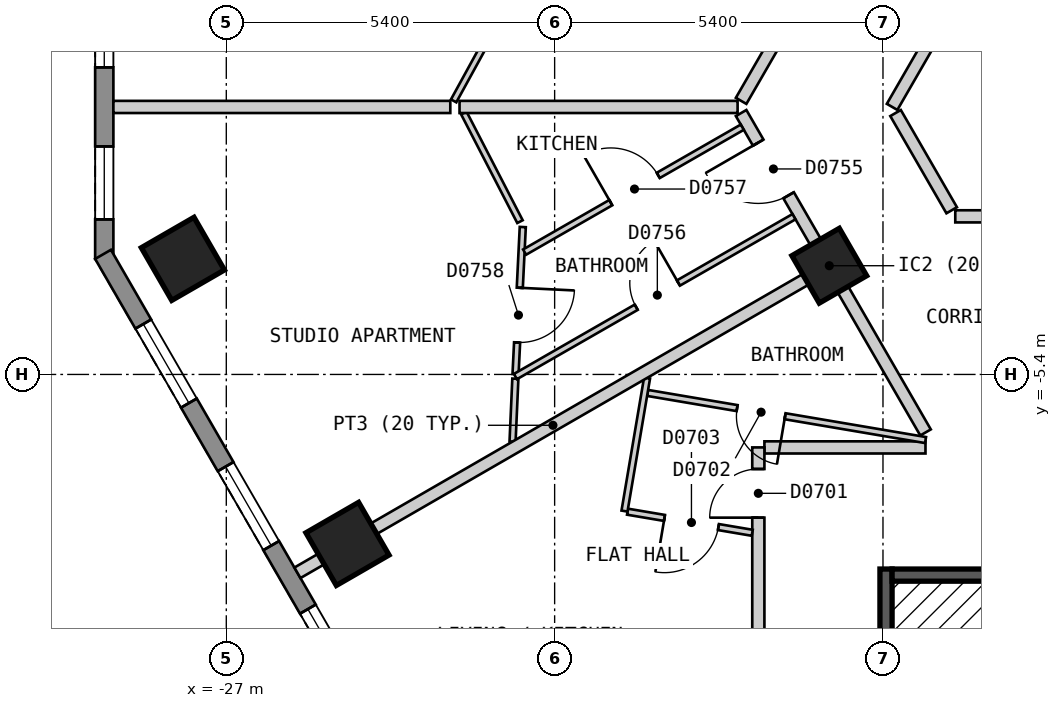
"""IFC4 building model, lengths in metres.
Left out: names, types, materials, properties, quantities, classifications, styles, units other than length and angle.
Written with IfcOpenShell. Run it as: python <this file> out.ifc"""

import sys

from ifc_helpers import new_model, si_unit, direction, frame, frame_2d, origin, origin_2d, place, context, subcontext, project, spatial, polyline, rectangle, outline, extrude, element, fill, save


model = new_model("IFC4")
c1 = context("Model", 3, precision=1e-05, world=origin(), true_north=direction((0.0, 1.0)))
c2 = subcontext(c1, "Body", "Model", "MODEL_VIEW")
j1 = project(units=[si_unit("LENGTHUNIT", "METRE"), si_unit("PLANEANGLEUNIT", "RADIAN")], contexts=[c1])
p1 = place(None, origin())
s1 = spatial("IfcSite", under=j1, at=p1, CompositionType="ELEMENT")
p2 = place(p1, origin())
s2 = spatial("IfcBuilding", under=s1, at=p2, CompositionType="ELEMENT")
p3 = place(p2, frame((0.0, 0.0, 93.0)))
s3 = spatial("IfcBuildingStorey", under=s2, at=p3, CompositionType="ELEMENT", Elevation=93.0)
for number, where, z_axis, x_axis in (
    (1, (-27.714, -3.499, 0.0), (0.0, 0.0, 1.0), (0.5, -0.866, 0.0)),
    (2, (-25.007, -8.187, 0.0), (0.0, 0.0, 1.0), (0.5, -0.866, 0.0)),
):
    element("IfcColumn", number, at=place(p3, frame(where, z_axis=z_axis, x_axis=x_axis)), inside=s3, PredefinedType="COLUMN", context=c2, shape_type="SweptSolid", body=[
        extrude(rectangle(XDim=1.0, YDim=1.0, at=origin_2d()), origin(), (0.0, 0.0, 1.0), 3.0),
    ])
p4 = place(p3, frame((-17.083, -3.612, 0.0), z_axis=(0.0, 0.0, 1.0), x_axis=(0.5, -0.866025403784, 0.0)))
e3 = element("IfcColumn", 3, at=p4, inside=s3, PredefinedType="COLUMN", context=c2, shape_type="SweptSolid", body=[
    extrude(rectangle(XDim=0.9, YDim=0.9, at=origin_2d()), origin(), (0.0, 0.0, 1.0), 3.0),
])
p5 = place(p3, frame((-29.007, 1.5, 0.0), z_axis=(0.0, 0.0, 1.0), x_axis=(0.0, -1.0, 0.0)))
e4 = element("IfcWall", 4, at=p5, inside=s3, PredefinedType="SOLIDWALL", context=c2, shape_type="SweptSolid", body=[
    extrude(outline(polyline([(0.0, -0.15), (5.0, -0.15), (4.92, 0.15), (0.08, 0.15), (0.0, -0.15)])), origin(), (0.0, 0.0, 1.0), 2.7),
])
p6 = place(p5, frame((0.65, 0.0, 0.15)))
e5 = element("IfcOpeningElement", 5, at=p6, cuts=e4, PredefinedType="OPENING", context=c2, shape_type="SweptSolid", body=[
    extrude(rectangle(XDim=1.2, YDim=2.1, at=frame_2d((0.6, 1.05))), frame((0.0, 0.16, 0.0), z_axis=(0.0, -1.0, 0.0), x_axis=(1.0, 0.0, 0.0)), (0.0, 0.0, 1.0), 0.32),
])
p7 = place(p5, frame((3.15, 0.0, 0.15)))
e6 = element("IfcOpeningElement", 6, at=p7, cuts=e4, PredefinedType="OPENING", context=c2, shape_type="SweptSolid", body=[
    extrude(rectangle(XDim=1.2, YDim=2.1, at=frame_2d((0.6, 1.05))), frame((0.0, 0.16, 0.0), z_axis=(0.0, -1.0, 0.0), x_axis=(1.0, 0.0, 0.0)), (0.0, 0.0, 1.0), 0.32),
])
p8 = place(p3, frame((-29.027, -3.425, 0.0), z_axis=(0.0, 0.0, 1.0), x_axis=(0.500035407905, -0.866004960056, 0.0)))
e7 = element("IfcWall", 7, at=p8, inside=s3, PredefinedType="SOLIDWALL", context=c2, shape_type="SweptSolid", body=[
    extrude(outline(polyline([(0.0, -0.15), (23.094, -0.15), (23.014, 0.15), (0.08, 0.15), (0.0, -0.15)])), origin(), (0.0, 0.0, 1.0), 2.7),
])
p9 = place(p8, frame((1.324, 0.0, 0.15)))
e8 = element("IfcOpeningElement", 8, at=p9, cuts=e7, PredefinedType="OPENING", context=c2, shape_type="SweptSolid", body=[
    extrude(rectangle(XDim=1.5, YDim=2.1, at=frame_2d((0.75, 1.05))), frame((0.0, 0.16, 0.0), z_axis=(0.0, -1.0, 0.0), x_axis=(1.0, 0.0, 0.0)), (0.0, 0.0, 1.0), 0.32),
])
p10 = place(p8, frame((4.031, 0.0, 0.15)))
e9 = element("IfcOpeningElement", 9, at=p10, cuts=e7, PredefinedType="OPENING", context=c2, shape_type="SweptSolid", body=[
    extrude(rectangle(XDim=1.5, YDim=2.1, at=frame_2d((0.75, 1.05))), frame((0.0, 0.16, 0.0), z_axis=(0.0, -1.0, 0.0), x_axis=(1.0, 0.0, 0.0)), (0.0, 0.0, 1.0), 0.32),
])
p11 = place(p8, frame((6.737, 0.0, 0.15)))
e10 = element("IfcOpeningElement", 10, at=p11, cuts=e7, PredefinedType="OPENING", context=c2, shape_type="SweptSolid", body=[
    extrude(rectangle(XDim=1.5, YDim=2.1, at=frame_2d((0.75, 1.05))), frame((0.0, 0.16, 0.0), z_axis=(0.0, -1.0, 0.0), x_axis=(1.0, 0.0, 0.0)), (0.0, 0.0, 1.0), 0.32),
])
p12 = place(p8, frame((9.444, 0.0, 0.15)))
e11 = element("IfcOpeningElement", 11, at=p12, cuts=e7, PredefinedType="OPENING", context=c2, shape_type="SweptSolid", body=[
    extrude(rectangle(XDim=1.5, YDim=2.1, at=frame_2d((0.75, 1.05))), frame((0.0, 0.16, 0.0), z_axis=(0.0, -1.0, 0.0), x_axis=(1.0, 0.0, 0.0)), (0.0, 0.0, 1.0), 0.32),
])
p13 = place(p8, frame((12.151, 0.0, 0.15)))
e12 = element("IfcOpeningElement", 12, at=p13, cuts=e7, PredefinedType="OPENING", context=c2, shape_type="SweptSolid", body=[
    extrude(rectangle(XDim=1.5, YDim=2.1, at=frame_2d((0.75, 1.05))), frame((0.0, 0.16, 0.0), z_axis=(0.0, -1.0, 0.0), x_axis=(1.0, 0.0, 0.0)), (0.0, 0.0, 1.0), 0.32),
])
p14 = place(p8, frame((14.857, 0.0, 0.15)))
e13 = element("IfcOpeningElement", 13, at=p14, cuts=e7, PredefinedType="OPENING", context=c2, shape_type="SweptSolid", body=[
    extrude(rectangle(XDim=1.5, YDim=2.1, at=frame_2d((0.75, 1.05))), frame((0.0, 0.16, 0.0), z_axis=(0.0, -1.0, 0.0), x_axis=(1.0, 0.0, 0.0)), (0.0, 0.0, 1.0), 0.32),
])
p15 = place(p8, frame((17.564, 0.0, 0.15)))
e14 = element("IfcOpeningElement", 14, at=p15, cuts=e7, PredefinedType="OPENING", context=c2, shape_type="SweptSolid", body=[
    extrude(rectangle(XDim=1.5, YDim=2.1, at=frame_2d((0.75, 1.05))), frame((0.0, 0.16, 0.0), z_axis=(0.0, -1.0, 0.0), x_axis=(1.0, 0.0, 0.0)), (0.0, 0.0, 1.0), 0.32),
])
p16 = place(p8, frame((20.27, 0.0, 0.15)))
e15 = element("IfcOpeningElement", 15, at=p16, cuts=e7, PredefinedType="OPENING", context=c2, shape_type="SweptSolid", body=[
    extrude(rectangle(XDim=1.5, YDim=2.1, at=frame_2d((0.75, 1.05))), frame((0.0, 0.16, 0.0), z_axis=(0.0, -1.0, 0.0), x_axis=(1.0, 0.0, 0.0)), (0.0, 0.0, 1.0), 0.32),
])
p17 = place(p3, frame((-15.993, -1.101, 0.0), z_axis=(0.0, 0.0, 1.0), x_axis=(0.499894174133, -0.866086493757, 0.0)))
e16 = element("IfcWall", 16, at=p17, inside=s3, PredefinedType="PARTITIONING", context=c2, shape_type="SweptSolid", body=[
    extrude(rectangle(XDim=1.846, YDim=0.2, at=frame_2d((0.923, 0.0))), origin(), (0.0, 0.0, 1.0), 2.7),
])
p18 = place(p3, frame((-18.533, -1.101, 0.0), z_axis=(0.0, 0.0, 1.0), x_axis=(0.500135180047, -0.865947343479, 0.0)))
e17 = element("IfcWall", 17, at=p18, inside=s3, PredefinedType="PARTITIONING", context=c2, shape_type="SweptSolid", body=[
    extrude(rectangle(XDim=2.799, YDim=0.2, at=frame_2d((1.399, 0.0))), origin(), (0.0, 0.0, 1.0), 2.7),
])
p19 = place(p18, frame((0.562, 0.0, 0.0)))
e18 = element("IfcOpeningElement", 18, at=p19, cuts=e17, PredefinedType="OPENING", context=c2, shape_type="SweptSolid", body=[
    extrude(rectangle(XDim=1.0, YDim=2.1, at=frame_2d((0.5, 1.05))), frame((0.0, 0.11, 0.0), z_axis=(0.0, -1.0, 0.0), x_axis=(1.0, 0.0, 0.0)), (0.0, 0.0, 1.0), 0.22),
])
p20 = place(p3, frame((-16.855, -4.008, 0.0), z_axis=(0.0, 0.0, 1.0), x_axis=(0.500151474942, -0.865937932021, 0.0)))
e19 = element("IfcWall", 19, at=p20, inside=s3, PredefinedType="PARTITIONING", context=c2, shape_type="SweptSolid", body=[
    extrude(rectangle(XDim=2.709, YDim=0.2, at=frame_2d((1.354, 0.0))), origin(), (0.0, 0.0, 1.0), 2.7),
])
p21 = place(p3, frame((-18.15, -6.6, 0.0), z_axis=(0.0, 0.0, 1.0), x_axis=(1.0, 0.0, 0.0)))
e20 = element("IfcWall", 20, at=p21, inside=s3, PredefinedType="PARTITIONING", context=c2, shape_type="SweptSolid", body=[
    extrude(rectangle(XDim=2.649, YDim=0.2, at=frame_2d((1.324, 0.0))), origin(), (0.0, 0.0, 1.0), 2.7),
])
p22 = place(p3, frame((-15.011, -2.8, 0.0), z_axis=(0.0, 0.0, 1.0), x_axis=(1.0, 0.0, 0.0)))
e21 = element("IfcWall", 21, at=p22, inside=s3, PredefinedType="PARTITIONING", context=c2, shape_type="SweptSolid", body=[
    extrude(rectangle(XDim=7.982, YDim=0.2, at=frame_2d((3.991, 0.0))), origin(), (0.0, 0.0, 1.0), 2.7),
])
p23 = place(p3, frame((-16.05, -1.0, 0.0), z_axis=(0.0, 0.0, 1.0), x_axis=(0.499962449088, 0.866047082728, 0.0)))
e22 = element("IfcWall", 22, at=p23, inside=s3, PredefinedType="PARTITIONING", context=c2, shape_type="SweptSolid", body=[
    extrude(rectangle(XDim=10.391, YDim=0.2, at=frame_2d((5.195, 0.0))), origin(), (0.0, 0.0, 1.0), 2.7),
])
p24 = place(p23, frame((4.745, 0.0, 0.0)))
e23 = element("IfcOpeningElement", 23, at=p24, cuts=e22, PredefinedType="OPENING", context=c2, shape_type="SweptSolid", body=[
    extrude(rectangle(XDim=0.9, YDim=2.1, at=frame_2d((0.45, 1.05))), frame((0.0, 0.11, 0.0), z_axis=(0.0, -1.0, 0.0), x_axis=(1.0, 0.0, 0.0)), (0.0, 0.0, 1.0), 0.22),
])
p25 = place(p3, frame((-18.533, -0.901, 0.0), z_axis=(0.0, 0.0, 1.0), x_axis=(0.499981198768, 0.866036258409, 0.0)))
e24 = element("IfcWall", 24, at=p25, inside=s3, PredefinedType="PARTITIONING", context=c2, shape_type="SweptSolid", body=[
    extrude(rectangle(XDim=20.093, YDim=0.2, at=frame_2d((10.046, 0.0))), origin(), (0.0, 0.0, 1.0), 2.7),
])
p26 = place(p25, frame((14.57, 0.0, 0.0)))
e25 = element("IfcOpeningElement", 25, at=p26, cuts=e24, PredefinedType="OPENING", context=c2, shape_type="SweptSolid", body=[
    extrude(rectangle(XDim=1.0, YDim=2.1, at=frame_2d((0.5, 1.05))), frame((0.0, 0.11, 0.0), z_axis=(0.0, -1.0, 0.0), x_axis=(1.0, 0.0, 0.0)), (0.0, 0.0, 1.0), 0.22),
])
p27 = place(p25, frame((4.523, 0.0, 0.0)))
e26 = element("IfcOpeningElement", 26, at=p27, cuts=e24, PredefinedType="OPENING", context=c2, shape_type="SweptSolid", body=[
    extrude(rectangle(XDim=1.0, YDim=2.1, at=frame_2d((0.5, 1.05))), frame((0.0, 0.11, 0.0), z_axis=(0.0, -1.0, 0.0), x_axis=(1.0, 0.0, 0.0)), (0.0, 0.0, 1.0), 0.22),
])
p28 = place(p3, frame((-18.25, -10.479, 0.0), z_axis=(0.0, 0.0, 1.0), x_axis=(0.0, 1.0, 0.0)))
e27 = element("IfcWall", 27, at=p28, inside=s3, PredefinedType="PARTITIONING", context=c2, shape_type="SweptSolid", body=[
    extrude(rectangle(XDim=3.879, YDim=0.2, at=frame_2d((1.939, 0.0))), origin(), (0.0, 0.0, 1.0), 2.7),
])
p29 = place(p28, frame((2.724, 0.0, 0.0)))
e28 = element("IfcOpeningElement", 28, at=p29, cuts=e27, PredefinedType="OPENING", context=c2, shape_type="SweptSolid", body=[
    extrude(rectangle(XDim=0.8, YDim=2.1, at=frame_2d((0.4, 1.05))), frame((0.0, 0.11, 0.0), z_axis=(0.0, -1.0, 0.0), x_axis=(1.0, 0.0, 0.0)), (0.0, 0.0, 1.0), 0.22),
])
p30 = place(p3, frame((-23.093, -1.101, 0.0), z_axis=(0.0, 0.0, 1.0), x_axis=(0.459171814268, -0.888347479865, 0.0)))
e29 = element("IfcWall", 29, at=p30, inside=s3, PredefinedType="PARTITIONING", context=c2, shape_type="SweptSolid", body=[
    extrude(rectangle(XDim=2.01, YDim=0.1, at=frame_2d((1.005, 0.0))), origin(), (0.0, 0.0, 1.0), 2.7),
])
p31 = place(p3, frame((-20.071, -5.704, 0.0), z_axis=(0.0, 0.0, 1.0), x_axis=(0.985933263306, -0.16713946364, 0.0)))
e30 = element("IfcWall", 30, at=p31, inside=s3, PredefinedType="PARTITIONING", context=c2, shape_type="SweptSolid", body=[
    extrude(rectangle(XDim=4.636, YDim=0.1, at=frame_2d((2.318, 0.0))), origin(), (0.0, 0.0, 1.0), 2.7),
])
p32 = place(p31, frame((1.493, 0.0, 0.0)))
e31 = element("IfcOpeningElement", 31, at=p32, cuts=e30, PredefinedType="OPENING", context=c2, shape_type="SweptSolid", body=[
    extrude(rectangle(XDim=0.8, YDim=2.1, at=frame_2d((0.4, 1.05))), frame((0.0, 0.06, 0.0), z_axis=(0.0, -1.0, 0.0), x_axis=(1.0, 0.0, 0.0)), (0.0, 0.0, 1.0), 0.12),
])
p33 = place(p3, frame((-20.401, -7.657, 0.0), z_axis=(0.0, 0.0, 1.0), x_axis=(0.985991281902, -0.166796858522, 0.0)))
e32 = element("IfcWall", 32, at=p33, inside=s3, PredefinedType="PARTITIONING", context=c2, shape_type="SweptSolid", body=[
    extrude(rectangle(XDim=2.08, YDim=0.1, at=frame_2d((1.04, 0.0))), origin(), (0.0, 0.0, 1.0), 2.7),
])
p34 = place(p33, frame((0.616, 0.0, 0.0)))
e33 = element("IfcOpeningElement", 33, at=p34, cuts=e32, PredefinedType="OPENING", context=c2, shape_type="SweptSolid", body=[
    extrude(rectangle(XDim=0.9, YDim=2.1, at=frame_2d((0.45, 1.05))), frame((0.0, 0.06, 0.0), z_axis=(0.0, -1.0, 0.0), x_axis=(1.0, 0.0, 0.0)), (0.0, 0.0, 1.0), 0.12),
])
p35 = place(p3, frame((-23.261, -0.901, 0.0), z_axis=(0.0, 0.0, 1.0), x_axis=(0.481037050261, 0.876700265927, 0.0)))
e34 = element("IfcWall", 34, at=p35, inside=s3, PredefinedType="PARTITIONING", context=c2, shape_type="SweptSolid", body=[
    extrude(rectangle(XDim=4.827, YDim=0.1, at=frame_2d((2.414, 0.0))), origin(), (0.0, 0.0, 1.0), 2.7),
])
p36 = place(p3, frame((-20.451, -7.647, 0.0), z_axis=(0.0, 0.0, 1.0), x_axis=(0.167037570483, 0.985950531237, 0.0)))
e35 = element("IfcWall", 35, at=p36, inside=s3, PredefinedType="PARTITIONING", context=c2, shape_type="SweptSolid", body=[
    extrude(rectangle(XDim=2.22, YDim=0.1, at=frame_2d((1.11, 0.0))), origin(), (0.0, 0.0, 1.0), 2.7),
])
p37 = place(p3, frame((-22.243, -5.395, 0.0), z_axis=(0.0, 0.0, 1.0), x_axis=(0.049092933256, 0.998794214993, 0.0)))
e36 = element("IfcWall", 36, at=p37, inside=s3, PredefinedType="PARTITIONING", context=c2, shape_type="SweptSolid", body=[
    extrude(rectangle(XDim=2.422, YDim=0.1, at=frame_2d((1.211, 0.0))), origin(), (0.0, 0.0, 1.0), 2.7),
])
p38 = place(p37, frame((0.522, 0.0, 0.0)))
e37 = element("IfcOpeningElement", 37, at=p38, cuts=e36, PredefinedType="OPENING", context=c2, shape_type="SweptSolid", body=[
    extrude(rectangle(XDim=0.9, YDim=2.1, at=frame_2d((0.45, 1.05))), frame((0.0, 0.06, 0.0), z_axis=(0.0, -1.0, 0.0), x_axis=(1.0, 0.0, 0.0)), (0.0, 0.0, 1.0), 0.12),
])
p39 = place(p3, frame((-22.292, -6.504, 0.0), z_axis=(0.0, 0.0, 1.0), x_axis=(0.04434829575, 0.999016130332, 0.0)))
e38 = element("IfcWall", 38, at=p39, inside=s3, PredefinedType="PARTITIONING", context=c2, shape_type="SweptSolid", body=[
    extrude(rectangle(XDim=1.035, YDim=0.1, at=frame_2d((0.518, 0.0))), origin(), (0.0, 0.0, 1.0), 2.7),
])
p40 = place(p3, frame((-22.245, -5.435, 0.0), z_axis=(0.0, 0.0, 1.0), x_axis=(0.867311485465, 0.497765795511, 0.0)))
e39 = element("IfcWall", 39, at=p40, inside=s3, PredefinedType="PARTITIONING", context=c2, shape_type="SweptSolid", body=[
    extrude(rectangle(XDim=5.282, YDim=0.1, at=frame_2d((2.641, 0.0))), origin(), (0.0, 0.0, 1.0), 2.7),
])
p41 = place(p40, frame((2.291, 0.0, 0.0)))
e40 = element("IfcOpeningElement", 40, at=p41, cuts=e39, PredefinedType="OPENING", context=c2, shape_type="SweptSolid", body=[
    extrude(rectangle(XDim=0.8, YDim=2.1, at=frame_2d((0.4, 1.05))), frame((0.0, 0.06, 0.0), z_axis=(0.0, -1.0, 0.0), x_axis=(1.0, 0.0, 0.0)), (0.0, 0.0, 1.0), 0.12),
])
p42 = place(p3, frame((-22.094, -3.388, 0.0), z_axis=(0.0, 0.0, 1.0), x_axis=(0.867386440944, 0.497635169644, 0.0)))
e41 = element("IfcWall", 41, at=p42, inside=s3, PredefinedType="PARTITIONING", context=c2, shape_type="SweptSolid", body=[
    extrude(rectangle(XDim=4.127, YDim=0.1, at=frame_2d((2.064, 0.0))), origin(), (0.0, 0.0, 1.0), 2.7),
])
p43 = place(p42, frame((1.634, 0.0, 0.0)))
e42 = element("IfcOpeningElement", 42, at=p43, cuts=e41, PredefinedType="OPENING", context=c2, shape_type="SweptSolid", body=[
    extrude(rectangle(XDim=0.9, YDim=2.1, at=frame_2d((0.45, 1.05))), frame((0.0, 0.06, 0.0), z_axis=(0.0, -1.0, 0.0), x_axis=(1.0, 0.0, 0.0)), (0.0, 0.0, 1.0), 0.12),
])
p44 = place(p3, frame((-17.224, -3.844, 0.0), z_axis=(0.0, 0.0, 1.0), x_axis=(0.986049492372, -0.166452391373, 0.0)))
e43 = element("IfcWall", 43, at=p44, inside=s3, PredefinedType="PARTITIONING", context=c2, shape_type="SweptSolid", body=[
    extrude(rectangle(XDim=0.27, YDim=0.2, at=frame_2d((0.135, 0.0))), origin(), (0.0, 0.0, 1.0), 2.7),
])
p45 = place(p3, frame((-28.857, -1.001, 0.0), z_axis=(0.0, 0.0, 1.0), x_axis=(1.0, 0.0, 0.0)))
e44 = element("IfcWall", 44, at=p45, inside=s3, PredefinedType="PARTITIONING", context=c2, shape_type="SweptSolid", body=[
    extrude(rectangle(XDim=5.541, YDim=0.2, at=frame_2d((2.771, 0.0))), origin(), (0.0, 0.0, 1.0), 2.7),
])
p46 = place(p3, frame((-23.164, -1.001, 0.0), z_axis=(0.0, 0.0, 1.0), x_axis=(1.0, 0.0, 0.0)))
e45 = element("IfcWall", 45, at=p46, inside=s3, PredefinedType="PARTITIONING", context=c2, shape_type="SweptSolid", body=[
    extrude(rectangle(XDim=4.573, YDim=0.2, at=frame_2d((2.287, 0.0))), origin(), (0.0, 0.0, 1.0), 2.7),
])
p47 = place(p3, frame((-25.83, -8.662, 0.0), z_axis=(0.0, 0.0, 1.0), x_axis=(0.866026801646, 0.499997578825, 0.0)))
e46 = element("IfcWall", 46, at=p47, inside=s3, PredefinedType="PARTITIONING", context=c2, shape_type="SweptSolid", body=[
    extrude(rectangle(XDim=9.704, YDim=0.2, at=frame_2d((4.852, 0.0))), origin(), (0.0, 0.0, 1.0), 2.7),
])
p48 = place(p3, frame((-17.385, -3.786, 0.0), z_axis=(0.0, 0.0, 1.0), x_axis=(0.86668269741, 0.498859801958, 0.0)))
e47 = element("IfcWall", 47, at=p48, inside=s3, PredefinedType="PARTITIONING", context=c2, shape_type="SweptSolid", body=[
    extrude(rectangle(XDim=0.319, YDim=0.2, at=frame_2d((0.159, 0.0))), origin(), (0.0, 0.0, 1.0), 2.7),
])
p49 = place(p3, frame((-16.15, -14.4, 0.0), z_axis=(0.0, 0.0, 1.0), x_axis=(0.0, 1.0, 0.0)))
e48 = element("IfcWall", 48, at=p49, inside=s3, PredefinedType="SOLIDWALL", context=c2, shape_type="SweptSolid", body=[
    extrude(rectangle(XDim=5.8, YDim=0.2, at=frame_2d((2.9, 0.0))), origin(), (0.0, 0.0, 1.0), 2.7),
])
p50 = place(p3, frame((-16.05, -8.7, 0.0), z_axis=(0.0, 0.0, 1.0), x_axis=(1.0, 0.0, 0.0)))
e49 = element("IfcWall", 49, at=p50, inside=s3, PredefinedType="SOLIDWALL", context=c2, shape_type="SweptSolid", body=[
    extrude(rectangle(XDim=2.75, YDim=0.2, at=frame_2d((1.375, 0.0))), origin(), (0.0, 0.0, 1.0), 2.7),
])
p51 = place(p6, origin())
e50 = element("IfcWindow", 50, at=p51, inside=s3, PartitioningType="SINGLE_PANEL", PredefinedType="WINDOW", context=c2, shape_type="SweptSolid", body=[
    extrude(rectangle(XDim=1.2, YDim=2.1, at=frame_2d((0.6, 1.05))), frame((0.0, 0.03, 0.0), z_axis=(0.0, -1.0, 0.0), x_axis=(1.0, 0.0, 0.0)), (0.0, 0.0, 1.0), 0.06),
])
fill(e5, e50)
p52 = place(p7, origin())
e51 = element("IfcWindow", 51, at=p52, inside=s3, PartitioningType="SINGLE_PANEL", PredefinedType="WINDOW", context=c2, shape_type="SweptSolid", body=[
    extrude(rectangle(XDim=1.2, YDim=2.1, at=frame_2d((0.6, 1.05))), frame((0.0, 0.03, 0.0), z_axis=(0.0, -1.0, 0.0), x_axis=(1.0, 0.0, 0.0)), (0.0, 0.0, 1.0), 0.06),
])
fill(e6, e51)
p53 = place(p9, origin())
e52 = element("IfcWindow", 52, at=p53, inside=s3, PartitioningType="SINGLE_PANEL", PredefinedType="WINDOW", context=c2, shape_type="SweptSolid", body=[
    extrude(rectangle(XDim=1.5, YDim=2.1, at=frame_2d((0.75, 1.05))), frame((0.0, 0.03, 0.0), z_axis=(0.0, -1.0, 0.0), x_axis=(1.0, 0.0, 0.0)), (0.0, 0.0, 1.0), 0.06),
])
fill(e8, e52)
p54 = place(p10, origin())
e53 = element("IfcWindow", 53, at=p54, inside=s3, PartitioningType="SINGLE_PANEL", PredefinedType="WINDOW", context=c2, shape_type="SweptSolid", body=[
    extrude(rectangle(XDim=1.5, YDim=2.1, at=frame_2d((0.75, 1.05))), frame((0.0, 0.03, 0.0), z_axis=(0.0, -1.0, 0.0), x_axis=(1.0, 0.0, 0.0)), (0.0, 0.0, 1.0), 0.06),
])
fill(e9, e53)
p55 = place(p11, origin())
e54 = element("IfcWindow", 54, at=p55, inside=s3, PartitioningType="SINGLE_PANEL", PredefinedType="WINDOW", context=c2, shape_type="SweptSolid", body=[
    extrude(rectangle(XDim=1.5, YDim=2.1, at=frame_2d((0.75, 1.05))), frame((0.0, 0.03, 0.0), z_axis=(0.0, -1.0, 0.0), x_axis=(1.0, 0.0, 0.0)), (0.0, 0.0, 1.0), 0.06),
])
fill(e10, e54)
p56 = place(p29, origin())
e55 = element("IfcDoor", 55, at=p56, inside=s3, OperationType="SINGLE_SWING_LEFT", PredefinedType="DOOR", context=c2, shape_type="SweptSolid", body=[
    extrude(rectangle(XDim=0.8, YDim=2.1, at=frame_2d((0.4, 1.05))), frame((0.0, 0.025, 0.0), z_axis=(0.0, -1.0, 0.0), x_axis=(1.0, 0.0, 0.0)), (0.0, 0.0, 1.0), 0.05),
])
fill(e28, e55)
p57 = place(p32, origin())
e56 = element("IfcDoor", 56, at=p57, inside=s3, OperationType="SINGLE_SWING_RIGHT", PredefinedType="DOOR", context=c2, shape_type="SweptSolid", body=[
    extrude(rectangle(XDim=0.8, YDim=2.1, at=frame_2d((0.4, 1.05))), frame((0.0, 0.025, 0.0), z_axis=(0.0, -1.0, 0.0), x_axis=(1.0, 0.0, 0.0)), (0.0, 0.0, 1.0), 0.05),
])
fill(e31, e56)
p58 = place(p34, origin())
e57 = element("IfcDoor", 57, at=p58, inside=s3, OperationType="SINGLE_SWING_LEFT", PredefinedType="DOOR", context=c2, shape_type="SweptSolid", body=[
    extrude(rectangle(XDim=0.9, YDim=2.1, at=frame_2d((0.45, 1.05))), frame((0.0, 0.025, 0.0), z_axis=(0.0, -1.0, 0.0), x_axis=(1.0, 0.0, 0.0)), (0.0, 0.0, 1.0), 0.05),
])
fill(e33, e57)
p59 = place(p19, origin())
e58 = element("IfcDoor", 58, at=p59, inside=s3, OperationType="SINGLE_SWING_LEFT", PredefinedType="DOOR", context=c2, shape_type="SweptSolid", body=[
    extrude(rectangle(XDim=1.0, YDim=2.1, at=frame_2d((0.5, 1.05))), frame((0.0, 0.025, 0.0), z_axis=(0.0, -1.0, 0.0), x_axis=(1.0, 0.0, 0.0)), (0.0, 0.0, 1.0), 0.05),
])
fill(e18, e58)
p60 = place(p41, origin())
e59 = element("IfcDoor", 59, at=p60, inside=s3, OperationType="SINGLE_SWING_RIGHT", PredefinedType="DOOR", context=c2, shape_type="SweptSolid", body=[
    extrude(rectangle(XDim=0.8, YDim=2.1, at=frame_2d((0.4, 1.05))), frame((0.0, 0.025, 0.0), z_axis=(0.0, -1.0, 0.0), x_axis=(1.0, 0.0, 0.0)), (0.0, 0.0, 1.0), 0.05),
])
fill(e40, e59)
p61 = place(p43, origin())
e60 = element("IfcDoor", 60, at=p61, inside=s3, OperationType="SINGLE_SWING_LEFT", PredefinedType="DOOR", context=c2, shape_type="SweptSolid", body=[
    extrude(rectangle(XDim=0.9, YDim=2.1, at=frame_2d((0.45, 1.05))), frame((0.0, 0.025, 0.0), z_axis=(0.0, -1.0, 0.0), x_axis=(1.0, 0.0, 0.0)), (0.0, 0.0, 1.0), 0.05),
])
fill(e42, e60)
p62 = place(p38, origin())
e61 = element("IfcDoor", 61, at=p62, inside=s3, OperationType="SINGLE_SWING_RIGHT", PredefinedType="DOOR", context=c2, shape_type="SweptSolid", body=[
    extrude(rectangle(XDim=0.9, YDim=2.1, at=frame_2d((0.45, 1.05))), frame((0.0, 0.025, 0.0), z_axis=(0.0, -1.0, 0.0), x_axis=(1.0, 0.0, 0.0)), (0.0, 0.0, 1.0), 0.05),
])
fill(e37, e61)
save(model, sys.argv[1])
